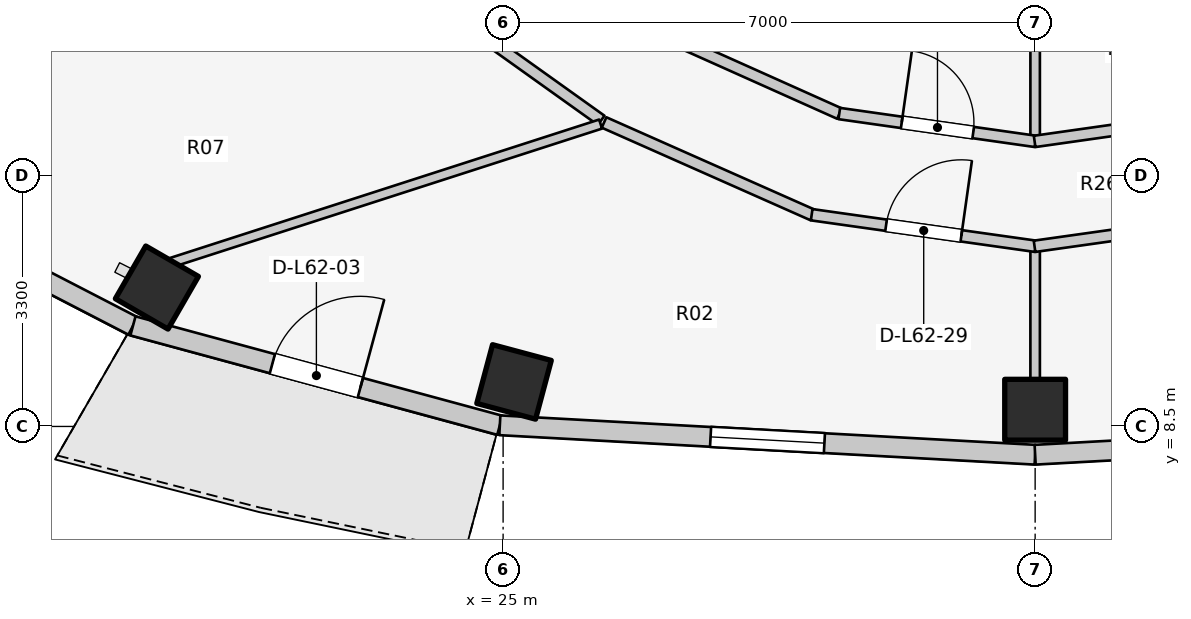
"""IFC4 building model, lengths in metres.
Left out: names, types, materials, properties, quantities, classifications, styles, units other than length and angle.
Written with IfcOpenShell. Run it as: python <this file> out.ifc"""

import sys

from ifc_helpers import new_model, si_unit, direction, frame, frame_2d, origin, origin_2d, place, context, subcontext, project, spatial, rectangle, extrude, element, fill, save


model = new_model("IFC4")
c1 = context("Model", 3, precision=1e-05, world=origin(), true_north=direction((0.0, 1.0)))
c2 = subcontext(c1, "Body", "Model", "MODEL_VIEW")
j1 = project(units=[si_unit("LENGTHUNIT", "METRE"), si_unit("PLANEANGLEUNIT", "RADIAN")], contexts=[c1])
p1 = place(None, origin())
s1 = spatial("IfcSite", under=j1, at=p1, CompositionType="ELEMENT")
p2 = place(p1, origin())
s2 = spatial("IfcBuilding", under=s1, at=p2, CompositionType="ELEMENT")
p3 = place(p2, frame((0.0, 0.0, 204.7)))
s3 = spatial("IfcBuildingStorey", under=s2, at=p3, CompositionType="ELEMENT", Elevation=204.7)
for number, where, z_axis, x_axis in (
    (1, (20.445, 10.327, 0.0), (0.0, 0.0, 1.0), (-0.5, -0.866, 0.0)),
    (2, (25.144, 9.086, 0.0), (0.0, 0.0, 1.0), (-0.259, -0.966, 0.0)),
    (3, (32.0, 8.72, 0.0), (0.0, 0.0, 1.0), (0.0, -1.0, 0.0)),
):
    element("IfcColumn", number, at=place(p3, frame(where, z_axis=z_axis, x_axis=x_axis)), inside=s3, PredefinedType="COLUMN", context=c2, shape_type="SweptSolid", body=[
        extrude(rectangle(XDim=0.8, YDim=0.8, at=origin_2d()), origin(), (0.0, 0.0, 1.0), 3.1),
    ])
p4 = place(p3, frame((16.442, 11.728, 0.0), z_axis=(0.0, 0.0, 1.0), x_axis=(0.88849146803, -0.458893137057, 0.0)))
e4 = element("IfcWall", 4, at=p4, inside=s3, PredefinedType="STANDARD", context=c2, shape_type="SweptSolid", body=[
    extrude(rectangle(XDim=4.15, YDim=0.26, at=frame_2d((2.075, 0.0))), origin(), (0.0, 0.0, 1.0), 2.85),
])
p5 = place(p3, frame((20.13, 9.823, 0.0), z_axis=(0.0, 0.0, 1.0), x_axis=(0.965213026382, -0.261464746576, 0.0)))
e5 = element("IfcWall", 5, at=p5, inside=s3, PredefinedType="STANDARD", context=c2, shape_type="SweptSolid", body=[
    extrude(rectangle(XDim=5.001, YDim=0.26, at=frame_2d((2.5, 0.0))), origin(), (0.0, 0.0, 1.0), 2.88),
])
p6 = place(p5, frame((1.9, 0.0, 0.0)))
e6 = element("IfcOpeningElement", 6, at=p6, cuts=e5, PredefinedType="OPENING", context=c2, shape_type="SweptSolid", body=[
    extrude(rectangle(XDim=1.2, YDim=2.2, at=frame_2d((0.6, 1.1))), frame((0.0, 0.14, 0.0), z_axis=(0.0, -1.0, 0.0), x_axis=(1.0, 0.0, 0.0)), (0.0, 0.0, 1.0), 0.28),
])
p7 = place(p3, frame((24.957, 8.515, 0.0), z_axis=(0.0, 0.0, 1.0), x_axis=(0.998490239527, -0.054929423535, 0.0)))
e7 = element("IfcWall", 7, at=p7, inside=s3, PredefinedType="STANDARD", context=c2, shape_type="SweptSolid", body=[
    extrude(rectangle(XDim=7.054, YDim=0.26, at=frame_2d((3.527, 0.0))), origin(), (0.0, 0.0, 1.0), 2.85),
])
p8 = place(p7, frame((2.777, 0.0, 0.75)))
e8 = element("IfcOpeningElement", 8, at=p8, cuts=e7, PredefinedType="OPENING", context=c2, shape_type="SweptSolid", body=[
    extrude(rectangle(XDim=1.5, YDim=1.6, at=frame_2d((0.75, 0.8))), frame((0.0, 0.14, 0.0), z_axis=(0.0, -1.0, 0.0), x_axis=(1.0, 0.0, 0.0)), (0.0, 0.0, 1.0), 0.28),
])
p9 = place(p3, frame((32.0, 8.128, 0.0), z_axis=(0.0, 0.0, 1.0), x_axis=(0.998490239527, 0.054929423535, 0.0)))
e9 = element("IfcWall", 9, at=p9, inside=s3, PredefinedType="STANDARD", context=c2, shape_type="SweptSolid", body=[
    extrude(rectangle(XDim=7.054, YDim=0.26, at=frame_2d((3.527, 0.0))), origin(), (0.0, 0.0, 1.0), 2.85),
])
p10 = place(p9, frame((2.777, 0.0, 0.75)))
e10 = element("IfcOpeningElement", 10, at=p10, cuts=e9, PredefinedType="OPENING", context=c2, shape_type="SweptSolid", body=[
    extrude(rectangle(XDim=1.5, YDim=1.6, at=frame_2d((0.75, 0.8))), frame((0.0, 0.14, 0.0), z_axis=(0.0, -1.0, 0.0), x_axis=(1.0, 0.0, 0.0)), (0.0, 0.0, 1.0), 0.28),
])
p11 = place(p3, frame((32.0, 14.9, 0.0), z_axis=(0.0, 0.0, 1.0), x_axis=(0.0, -1.0, 0.0)))
e11 = element("IfcWall", 11, at=p11, inside=s3, PredefinedType="PARTITIONING", context=c2, shape_type="SweptSolid", body=[
    extrude(rectangle(XDim=2.65, YDim=0.125, at=frame_2d((1.325, 0.0))), origin(), (0.0, 0.0, 1.0), 2.376),
])
p12 = place(p3, frame((27.019, 13.694, 0.0), z_axis=(0.0, 0.0, 1.0), x_axis=(0.912628408652, -0.408790151203, 0.0)))
e12 = element("IfcWall", 12, at=p12, inside=s3, PredefinedType="PARTITIONING", context=c2, shape_type="SweptSolid", body=[
    extrude(rectangle(XDim=2.638, YDim=0.15, at=frame_2d((1.319, 0.0))), origin(), (0.0, 0.0, 1.0), 2.376),
])
p13 = place(p3, frame((29.423, 12.617, 0.0), z_axis=(0.0, 0.0, 1.0), x_axis=(0.990078185178, -0.140517569133, 0.0)))
e13 = element("IfcWall", 13, at=p13, inside=s3, PredefinedType="PARTITIONING", context=c2, shape_type="SweptSolid", body=[
    extrude(rectangle(XDim=2.61, YDim=0.15, at=frame_2d((1.305, 0.0))), origin(), (0.0, 0.0, 1.0), 2.376),
])
p14 = place(p13, frame((0.83, 0.0, 0.0)))
e14 = element("IfcOpeningElement", 14, at=p14, cuts=e13, PredefinedType="OPENING", context=c2, shape_type="SweptSolid", body=[
    extrude(rectangle(XDim=0.95, YDim=2.1, at=frame_2d((0.475, 1.05))), frame((0.0, 0.085, 0.0), z_axis=(0.0, -1.0, 0.0), x_axis=(1.0, 0.0, 0.0)), (0.0, 0.0, 1.0), 0.17),
])
p15 = place(p3, frame((31.993, 12.25, 0.0), z_axis=(0.0, 0.0, 1.0), x_axis=(0.990078185178, 0.140517569133, 0.0)))
e15 = element("IfcWall", 15, at=p15, inside=s3, PredefinedType="PARTITIONING", context=c2, shape_type="SweptSolid", body=[
    extrude(rectangle(XDim=2.61, YDim=0.15, at=frame_2d((1.305, 0.0))), origin(), (0.0, 0.0, 1.0), 2.376),
])
p16 = place(p3, frame((26.29, 12.527, 0.0), z_axis=(0.0, 0.0, 1.0), x_axis=(-0.813780999276, 0.581171648669, 0.0)))
e16 = element("IfcWall", 16, at=p16, inside=s3, PredefinedType="PARTITIONING", context=c2, shape_type="SweptSolid", body=[
    extrude(rectangle(XDim=2.082, YDim=0.15, at=frame_2d((1.041, 0.0))), origin(), (0.0, 0.0, 1.0), 2.376),
])
p17 = place(p3, frame((26.283, 12.478, 0.0), z_axis=(0.0, 0.0, 1.0), x_axis=(-0.951711719757, -0.306993163568, 0.0)))
e17 = element("IfcWall", 17, at=p17, inside=s3, PredefinedType="PARTITIONING", context=c2, shape_type="SweptSolid", body=[
    extrude(rectangle(XDim=5.934, YDim=0.125, at=frame_2d((2.967, 0.0))), origin(), (0.0, 0.0, 1.0), 2.376),
])
p18 = place(p3, frame((32.0, 10.815, 0.0), z_axis=(0.0, 0.0, 1.0), x_axis=(0.0, -1.0, 0.0)))
e18 = element("IfcWall", 18, at=p18, inside=s3, PredefinedType="PARTITIONING", context=c2, shape_type="SweptSolid", body=[
    extrude(rectangle(XDim=1.715, YDim=0.125, at=frame_2d((0.857, 0.0))), origin(), (0.0, 0.0, 1.0), 2.376),
])
p19 = place(p3, frame((26.328, 12.499, 0.0), z_axis=(0.0, 0.0, 1.0), x_axis=(0.914139569865, -0.405399613724, 0.0)))
e19 = element("IfcWall", 19, at=p19, inside=s3, PredefinedType="PARTITIONING", context=c2, shape_type="SweptSolid", body=[
    extrude(rectangle(XDim=3.005, YDim=0.15, at=frame_2d((1.502, 0.0))), origin(), (0.0, 0.0, 1.0), 2.376),
])
p20 = place(p3, frame((29.06, 11.285, 0.0), z_axis=(0.0, 0.0, 1.0), x_axis=(0.99022315503, -0.139492305317, 0.0)))
e20 = element("IfcWall", 20, at=p20, inside=s3, PredefinedType="PARTITIONING", context=c2, shape_type="SweptSolid", body=[
    extrude(rectangle(XDim=2.977, YDim=0.15, at=frame_2d((1.489, 0.0))), origin(), (0.0, 0.0, 1.0), 2.376),
])
p21 = place(p20, frame((0.989, 0.0, 0.0)))
e21 = element("IfcOpeningElement", 21, at=p21, cuts=e20, PredefinedType="OPENING", context=c2, shape_type="SweptSolid", body=[
    extrude(rectangle(XDim=1.0, YDim=2.1, at=frame_2d((0.5, 1.05))), frame((0.0, 0.085, 0.0), z_axis=(0.0, -1.0, 0.0), x_axis=(1.0, 0.0, 0.0)), (0.0, 0.0, 1.0), 0.17),
])
p22 = place(p3, frame((31.992, 10.87, 0.0), z_axis=(0.0, 0.0, 1.0), x_axis=(0.99022315503, 0.139492305317, 0.0)))
e22 = element("IfcWall", 22, at=p22, inside=s3, PredefinedType="PARTITIONING", context=c2, shape_type="SweptSolid", body=[
    extrude(rectangle(XDim=2.977, YDim=0.15, at=frame_2d((1.489, 0.0))), origin(), (0.0, 0.0, 1.0), 2.376),
])
p23 = place(p6, origin())
e23 = element("IfcDoor", 23, at=p23, inside=s3, OperationType="SINGLE_SWING_RIGHT", PredefinedType="DOOR", context=c2, shape_type="SweptSolid", body=[
    extrude(rectangle(XDim=1.2, YDim=2.2, at=frame_2d((0.6, 1.1))), frame((0.0, 0.025, 0.0), z_axis=(0.0, -1.0, 0.0), x_axis=(1.0, 0.0, 0.0)), (0.0, 0.0, 1.0), 0.05),
])
fill(e6, e23)
p24 = place(p8, origin())
e24 = element("IfcWindow", 24, at=p24, inside=s3, PartitioningType="SINGLE_PANEL", PredefinedType="WINDOW", context=c2, shape_type="SweptSolid", body=[
    extrude(rectangle(XDim=1.5, YDim=1.6, at=frame_2d((0.75, 0.8))), frame((0.0, 0.03, 0.0), z_axis=(0.0, -1.0, 0.0), x_axis=(1.0, 0.0, 0.0)), (0.0, 0.0, 1.0), 0.06),
])
fill(e8, e24)
p25 = place(p14, origin())
e25 = element("IfcDoor", 25, at=p25, inside=s3, OperationType="SINGLE_SWING_LEFT", PredefinedType="DOOR", context=c2, shape_type="SweptSolid", body=[
    extrude(rectangle(XDim=0.95, YDim=2.1, at=frame_2d((0.475, 1.05))), frame((0.0, 0.025, 0.0), z_axis=(0.0, -1.0, 0.0), x_axis=(1.0, 0.0, 0.0)), (0.0, 0.0, 1.0), 0.05),
])
fill(e14, e25)
p26 = place(p21, origin())
e26 = element("IfcDoor", 26, at=p26, inside=s3, OperationType="SINGLE_SWING_RIGHT", PredefinedType="DOOR", context=c2, shape_type="SweptSolid", body=[
    extrude(rectangle(XDim=1.0, YDim=2.1, at=frame_2d((0.5, 1.05))), frame((0.0, 0.025, 0.0), z_axis=(0.0, -1.0, 0.0), x_axis=(1.0, 0.0, 0.0)), (0.0, 0.0, 1.0), 0.05),
])
fill(e21, e26)
save(model, sys.argv[1])
